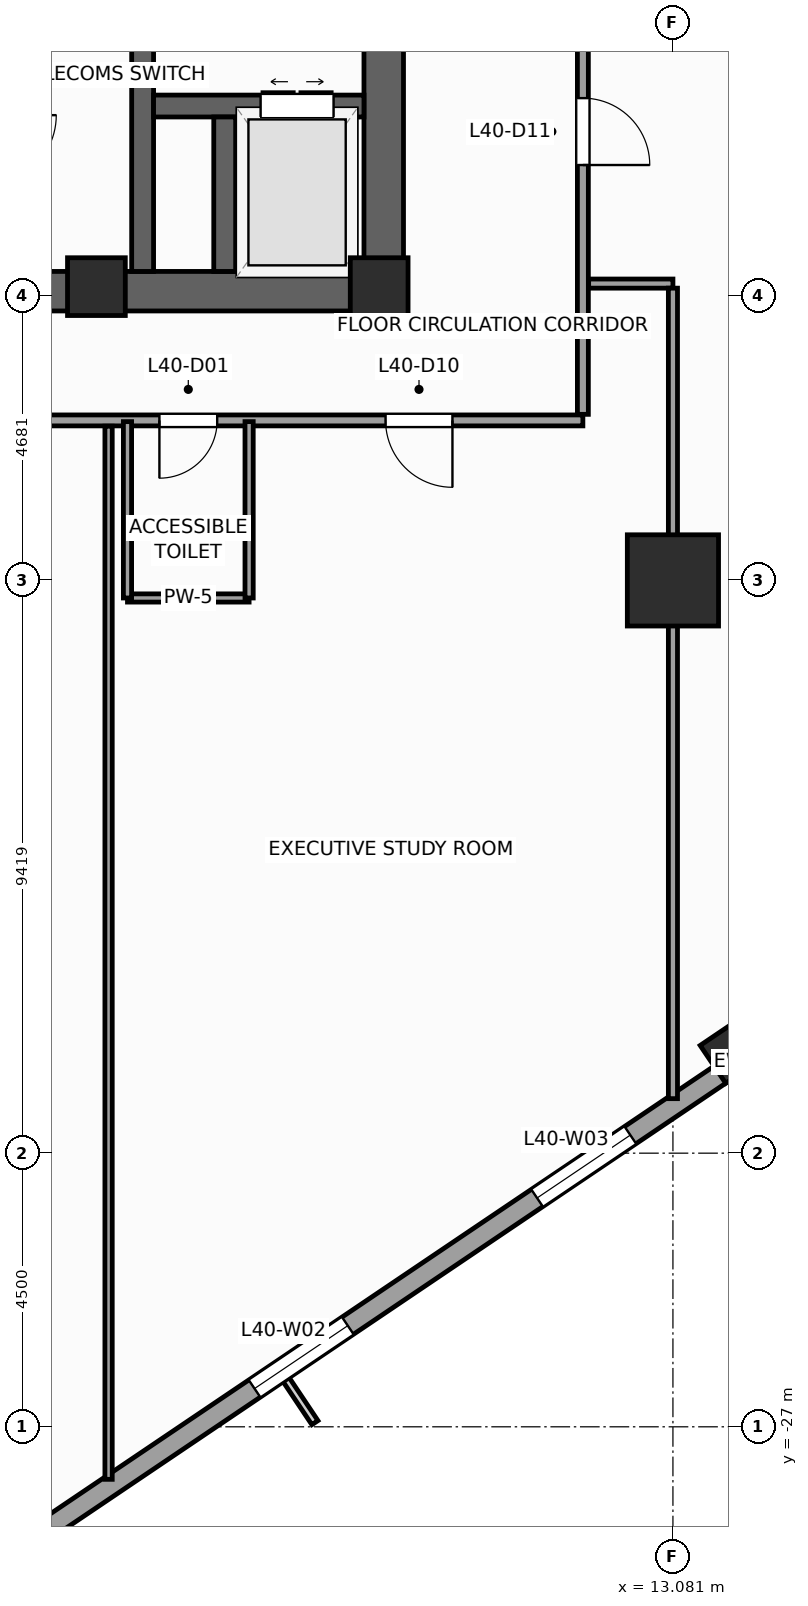
"""IFC4 building model, lengths in metres.
Left out: names, types, materials, properties, quantities, classifications, styles, units other than length and angle.
Written with IfcOpenShell. Run it as: python <this file> out.ifc"""

import sys

from ifc_helpers import new_model, si_unit, direction, frame, frame_2d, origin, origin_2d, place, context, subcontext, project, spatial, rectangle, extrude, source, transform, mapped, element, fill, save


model = new_model("IFC4")
c1 = context("Model", 3, precision=1e-05, world=origin(), true_north=direction((0.0, 1.0)))
c2 = subcontext(c1, "Body", "Model", "MODEL_VIEW")
j1 = project(units=[si_unit("LENGTHUNIT", "METRE"), si_unit("PLANEANGLEUNIT", "RADIAN")], contexts=[c1])
p1 = place(None, origin())
s1 = spatial("IfcSite", under=j1, at=p1, CompositionType="ELEMENT")
p2 = place(p1, origin())
s2 = spatial("IfcBuilding", under=s1, at=p2, CompositionType="ELEMENT")
p3 = place(p2, frame((0.0, 0.0, 168.4)))
s3 = spatial("IfcBuildingStorey", under=s2, at=p3, CompositionType="ELEMENT", Elevation=168.4)
p4 = place(p3, frame((-8.65, -8.325, 0.0), z_axis=(0.0, 0.0, 1.0), x_axis=(1.0, 0.0, 0.0)))
e1 = element("IfcWall", 1, at=p4, inside=s3, PredefinedType="SHEAR", context=c2, shape_type="SweptSolid", body=[
    extrude(rectangle(XDim=17.3, YDim=0.65, at=frame_2d((8.65, 0.0))), origin(), (0.0, 0.0, 1.0), 4.0),
])
p5 = place(p4, frame((8.0, 0.0, 0.0)))
e2 = element("IfcOpeningElement", 2, at=p5, cuts=e1, PredefinedType="OPENING", context=c2, shape_type="SweptSolid", body=[
    extrude(rectangle(XDim=1.3, YDim=2.2, at=frame_2d((0.65, 1.1))), frame((0.0, 0.335, 0.0), z_axis=(0.0, -1.0, 0.0), x_axis=(1.0, 0.0, 0.0)), (0.0, 0.0, 1.0), 0.67),
])
p6 = place(p3, frame((8.325, -8.0, 0.0), z_axis=(0.0, 0.0, 1.0), x_axis=(0.0, 1.0, 0.0)))
e3 = element("IfcWall", 3, at=p6, inside=s3, PredefinedType="SHEAR", context=c2, shape_type="SweptSolid", body=[
    extrude(rectangle(XDim=16.0, YDim=0.65, at=frame_2d((8.0, 0.0))), origin(), (0.0, 0.0, 1.0), 4.0),
])
p7 = place(p6, frame((4.69, 0.0, 0.0)))
e4 = element("IfcOpeningElement", 4, at=p7, cuts=e3, PredefinedType="OPENING", context=c2, shape_type="SweptSolid", body=[
    extrude(rectangle(XDim=1.3, YDim=2.2, at=frame_2d((0.65, 1.1))), frame((0.0, 0.335, 0.0), z_axis=(0.0, -1.0, 0.0), x_axis=(1.0, 0.0, 0.0)), (0.0, 0.0, 1.0), 0.67),
])
p8 = place(p3, frame((4.36, -8.0, 0.0), z_axis=(0.0, 0.0, 1.0), x_axis=(0.0, 1.0, 0.0)))
e5 = element("IfcWall", 5, at=p8, inside=s3, PredefinedType="SHEAR", context=c2, shape_type="SweptSolid", body=[
    extrude(rectangle(XDim=16.0, YDim=0.36, at=frame_2d((8.0, 0.0))), origin(), (0.0, 0.0, 1.0), 4.0),
])
p9 = place(p3, frame((4.54, -5.28, 0.0), z_axis=(0.0, 0.0, 1.0), x_axis=(1.0, 0.0, 0.0)))
e6 = element("IfcWall", 6, at=p9, inside=s3, PredefinedType="SHEAR", context=c2, shape_type="SweptSolid", body=[
    extrude(rectangle(XDim=3.46, YDim=0.36, at=frame_2d((1.73, 0.0))), origin(), (0.0, 0.0, 1.0), 4.0),
])
p10 = place(p9, frame((1.76, 0.0, 0.0)))
e7 = element("IfcOpeningElement", 7, at=p10, cuts=e6, PredefinedType="OPENING", context=c2, shape_type="SweptSolid", body=[
    extrude(rectangle(XDim=1.2, YDim=2.25, at=frame_2d((0.6, 1.125))), frame((0.0, 0.19, 0.0), z_axis=(0.0, -1.0, 0.0), x_axis=(1.0, 0.0, 0.0)), (0.0, 0.0, 1.0), 0.38),
])
p11 = place(p3, frame((5.71, -8.0, 0.0), z_axis=(0.0, 0.0, 1.0), x_axis=(0.0, 1.0, 0.0)))
e8 = element("IfcWall", 8, at=p11, inside=s3, PredefinedType="SHEAR", context=c2, shape_type="SweptSolid", body=[
    extrude(rectangle(XDim=2.54, YDim=0.36, at=frame_2d((1.27, 0.0))), origin(), (0.0, 0.0, 1.0), 4.0),
])
m1 = source(origin(), c2, "Body", "SweptSolid", [
    extrude(rectangle(XDim=0.95, YDim=0.95, at=origin_2d()), origin(), (0.0, 0.0, 1.0), 4.0),
])
for number, where, z_axis, x_axis in (
    (9, (8.25, -8.25, 0.0), (0.0, 0.0, 1.0), (1.0, 0.0, 0.0)),
    (10, (3.6, -8.25, 0.0), (0.0, 0.0, 1.0), (1.0, 0.0, 0.0)),
):
    element("IfcColumn", number, at=place(p3, frame(where, z_axis=z_axis, x_axis=x_axis)), inside=s3, PredefinedType="PILASTER", context=c2, shape_type="MappedRepresentation", body=[
        mapped(m1, transform((0.0, 0.0, 0.0), scale=1.0)),
    ])
m2 = source(origin(), c2, "Body", "SweptSolid", [
    extrude(rectangle(XDim=1.5, YDim=1.5, at=origin_2d()), origin(), (0.0, 0.0, 1.0), 4.0),
])
p12 = place(p3, frame((13.081, -13.081, 0.0), z_axis=(0.0, 0.0, 1.0), x_axis=(1.0, 0.0, 0.0)))
e11 = element("IfcColumn", 11, at=p12, inside=s3, PredefinedType="COLUMN", context=c2, shape_type="MappedRepresentation", body=[
    mapped(m2, transform((0.0, 0.0, 0.0), scale=1.0)),
])
m3 = source(origin(), c2, "Body", "SweptSolid", [
    extrude(rectangle(XDim=0.75, YDim=0.75, at=origin_2d()), origin(), (0.0, 0.0, 1.0), 4.0),
])
p13 = place(p3, frame((14.05, -20.83, 0.0), z_axis=(0.0, 0.0, 1.0), x_axis=(0.829037572555, 0.559192903471, 0.0)))
e12 = element("IfcColumn", 12, at=p13, inside=s3, PredefinedType="COLUMN", context=c2, shape_type="MappedRepresentation", body=[
    mapped(m3, transform((0.0, 0.0, 0.0), scale=1.0)),
])
p14 = place(p3, frame((-2.972, -32.558, 0.0), z_axis=(0.0, 0.0, 1.0), x_axis=(0.829036218961, 0.559194910251, 0.0)))
e13 = element("IfcWall", 13, at=p14, inside=s3, PredefinedType="STANDARD", context=c2, shape_type="SweptSolid", body=[
    extrude(rectangle(XDim=41.34, YDim=0.34, at=frame_2d((20.67, 0.0))), origin(), (0.0, 0.0, 1.0), 3.04),
])
p15 = place(p14, frame((4.261, 0.0, 0.56)))
e14 = element("IfcOpeningElement", 14, at=p15, cuts=e13, PredefinedType="OPENING", context=c2, shape_type="SweptSolid", body=[
    extrude(rectangle(XDim=1.4, YDim=2.4, at=frame_2d((0.7, 1.2))), frame((0.0, 0.18, 0.0), z_axis=(0.0, -1.0, 0.0), x_axis=(1.0, 0.0, 0.0)), (0.0, 0.0, 1.0), 0.36),
])
p16 = place(p14, frame((11.064, 0.0, 0.61)))
e15 = element("IfcOpeningElement", 15, at=p16, cuts=e13, PredefinedType="OPENING", context=c2, shape_type="SweptSolid", body=[
    extrude(rectangle(XDim=1.85, YDim=2.35, at=frame_2d((0.925, 1.175))), frame((0.0, 0.18, 0.0), z_axis=(0.0, -1.0, 0.0), x_axis=(1.0, 0.0, 0.0)), (0.0, 0.0, 1.0), 0.36),
])
p17 = place(p14, frame((16.668, 0.0, 0.61)))
e16 = element("IfcOpeningElement", 16, at=p17, cuts=e13, PredefinedType="OPENING", context=c2, shape_type="SweptSolid", body=[
    extrude(rectangle(XDim=1.85, YDim=2.35, at=frame_2d((0.925, 1.175))), frame((0.0, 0.18, 0.0), z_axis=(0.0, -1.0, 0.0), x_axis=(1.0, 0.0, 0.0)), (0.0, 0.0, 1.0), 0.36),
])
p18 = place(p14, frame((27.186, 0.0, 0.61)))
e17 = element("IfcOpeningElement", 17, at=p18, cuts=e13, PredefinedType="OPENING", context=c2, shape_type="SweptSolid", body=[
    extrude(rectangle(XDim=1.85, YDim=2.35, at=frame_2d((0.925, 1.175))), frame((0.0, 0.18, 0.0), z_axis=(0.0, -1.0, 0.0), x_axis=(1.0, 0.0, 0.0)), (0.0, 0.0, 1.0), 0.36),
])
p19 = place(p14, frame((34.852, 0.0, 0.56)))
e18 = element("IfcOpeningElement", 18, at=p19, cuts=e13, PredefinedType="OPENING", context=c2, shape_type="SweptSolid", body=[
    extrude(rectangle(XDim=1.4, YDim=2.4, at=frame_2d((0.7, 1.2))), frame((0.0, 0.18, 0.0), z_axis=(0.0, -1.0, 0.0), x_axis=(1.0, 0.0, 0.0)), (0.0, 0.0, 1.0), 0.36),
])
p20 = place(p3, frame((-10.45, -10.45, 0.0), z_axis=(0.0, 0.0, 1.0), x_axis=(1.0, 0.0, 0.0)))
e19 = element("IfcWall", 19, at=p20, inside=s3, PredefinedType="PARTITIONING", context=c2, shape_type="SweptSolid", body=[
    extrude(rectangle(XDim=22.05, YDim=0.18, at=frame_2d((11.025, 0.0))), origin(), (0.0, 0.0, 1.0), 3.74),
])
p21 = place(p20, frame((15.086, 0.0, 0.0)))
e20 = element("IfcOpeningElement", 20, at=p21, cuts=e19, PredefinedType="OPENING", context=c2, shape_type="SweptSolid", body=[
    extrude(rectangle(XDim=0.95, YDim=2.1, at=frame_2d((0.475, 1.05))), frame((0.0, 0.1, 0.0), z_axis=(0.0, -1.0, 0.0), x_axis=(1.0, 0.0, 0.0)), (0.0, 0.0, 1.0), 0.2),
])
p22 = place(p20, frame((7.611, 0.0, 0.0)))
e21 = element("IfcOpeningElement", 21, at=p22, cuts=e19, PredefinedType="OPENING", context=c2, shape_type="SweptSolid", body=[
    extrude(rectangle(XDim=0.95, YDim=2.1, at=frame_2d((0.475, 1.05))), frame((0.0, 0.1, 0.0), z_axis=(0.0, -1.0, 0.0), x_axis=(1.0, 0.0, 0.0)), (0.0, 0.0, 1.0), 0.2),
])
p23 = place(p20, frame((2.939, 0.0, 0.0)))
e22 = element("IfcOpeningElement", 22, at=p23, cuts=e19, PredefinedType="OPENING", context=c2, shape_type="SweptSolid", body=[
    extrude(rectangle(XDim=1.1, YDim=2.2, at=frame_2d((0.55, 1.1))), frame((0.0, 0.1, 0.0), z_axis=(0.0, -1.0, 0.0), x_axis=(1.0, 0.0, 0.0)), (0.0, 0.0, 1.0), 0.2),
])
p24 = place(p20, frame((11.175, 0.0, 0.0)))
e23 = element("IfcOpeningElement", 23, at=p24, cuts=e19, PredefinedType="OPENING", context=c2, shape_type="SweptSolid", body=[
    extrude(rectangle(XDim=1.1, YDim=2.2, at=frame_2d((0.55, 1.1))), frame((0.0, 0.1, 0.0), z_axis=(0.0, -1.0, 0.0), x_axis=(1.0, 0.0, 0.0)), (0.0, 0.0, 1.0), 0.2),
])
p25 = place(p20, frame((18.805, 0.0, 0.0)))
e24 = element("IfcOpeningElement", 24, at=p25, cuts=e19, PredefinedType="OPENING", context=c2, shape_type="SweptSolid", body=[
    extrude(rectangle(XDim=1.1, YDim=2.2, at=frame_2d((0.55, 1.1))), frame((0.0, 0.1, 0.0), z_axis=(0.0, -1.0, 0.0), x_axis=(1.0, 0.0, 0.0)), (0.0, 0.0, 1.0), 0.2),
])
p26 = place(p3, frame((11.6, -10.35, 0.0), z_axis=(0.0, 0.0, 1.0), x_axis=(0.0, 1.0, 0.0)))
e25 = element("IfcWall", 25, at=p26, inside=s3, PredefinedType="PARTITIONING", context=c2, shape_type="SweptSolid", body=[
    extrude(rectangle(XDim=11.95, YDim=0.18, at=frame_2d((5.975, 0.0))), origin(), (0.0, 0.0, 1.0), 3.74),
])
p27 = place(p26, frame((9.911, 0.0, 0.0)))
e26 = element("IfcOpeningElement", 26, at=p27, cuts=e25, PredefinedType="OPENING", context=c2, shape_type="SweptSolid", body=[
    extrude(rectangle(XDim=1.1, YDim=2.2, at=frame_2d((0.55, 1.1))), frame((0.0, 0.1, 0.0), z_axis=(0.0, -1.0, 0.0), x_axis=(1.0, 0.0, 0.0)), (0.0, 0.0, 1.0), 0.2),
])
p28 = place(p26, frame((4.1, 0.0, 0.0)))
e27 = element("IfcOpeningElement", 27, at=p28, cuts=e25, PredefinedType="OPENING", context=c2, shape_type="SweptSolid", body=[
    extrude(rectangle(XDim=1.1, YDim=2.2, at=frame_2d((0.55, 1.1))), frame((0.0, 0.1, 0.0), z_axis=(0.0, -1.0, 0.0), x_axis=(1.0, 0.0, 0.0)), (0.0, 0.0, 1.0), 0.2),
])
p29 = place(p26, frame((7.675, 0.0, 0.0)))
e28 = element("IfcOpeningElement", 28, at=p29, cuts=e25, PredefinedType="OPENING", context=c2, shape_type="SweptSolid", body=[
    extrude(rectangle(XDim=1.1, YDim=2.2, at=frame_2d((0.55, 1.1))), frame((0.0, 0.1, 0.0), z_axis=(0.0, -1.0, 0.0), x_axis=(1.0, 0.0, 0.0)), (0.0, 0.0, 1.0), 0.2),
])
p30 = place(p3, frame((3.8, -27.864, 0.0), z_axis=(0.0, 0.0, 1.0), x_axis=(0.0, 1.0, 0.0)))
e29 = element("IfcWall", 29, at=p30, inside=s3, PredefinedType="PARTITIONING", context=c2, shape_type="SweptSolid", body=[
    extrude(rectangle(XDim=17.319, YDim=0.12, at=frame_2d((8.659, 0.0))), origin(), (0.0, 0.0, 1.0), 3.74),
])
p31 = place(p3, frame((11.695, -8.2, 0.0), z_axis=(0.0, 0.0, 1.0), x_axis=(1.0, 0.0, 0.0)))
e30 = element("IfcWall", 30, at=p31, inside=s3, PredefinedType="PARTITIONING", context=c2, shape_type="SweptSolid", body=[
    extrude(rectangle(XDim=1.386, YDim=0.15, at=frame_2d((0.693, 0.0))), origin(), (0.0, 0.0, 1.0), 3.74),
])
p32 = place(p3, frame((13.081, -8.275, 0.0), z_axis=(0.0, 0.0, 1.0), x_axis=(0.0, -1.0, 0.0)))
e31 = element("IfcWall", 31, at=p32, inside=s3, PredefinedType="PARTITIONING", context=c2, shape_type="SweptSolid", body=[
    extrude(rectangle(XDim=13.329, YDim=0.15, at=frame_2d((6.664, 0.0))), origin(), (0.0, 0.0, 1.0), 2.84),
])
p33 = place(p3, frame((4.111, -13.37, 0.0), z_axis=(0.0, 0.0, 1.0), x_axis=(1.0, 0.0, 0.0)))
e32 = element("IfcWall", 32, at=p33, inside=s3, PredefinedType="PARTITIONING", context=c2, shape_type="SweptSolid", body=[
    extrude(rectangle(XDim=2.0, YDim=0.135, at=frame_2d((1.0, 0.0))), origin(), (0.0, 0.0, 1.0), 2.84),
])
for number, where, z_axis, x_axis in (
    (33, (6.111, -13.37, 0.0), (0.0, 0.0, 1.0), (0.0, 1.0, 0.0)),
    (34, (4.111, -13.37, 0.0), (0.0, 0.0, 1.0), (0.0, 1.0, 0.0)),
):
    element("IfcWall", number, at=place(p3, frame(where, z_axis=z_axis, x_axis=x_axis)), inside=s3, PredefinedType="PARTITIONING", context=c2, shape_type="SweptSolid", body=[
        extrude(rectangle(XDim=2.9, YDim=0.135, at=frame_2d((1.45, 0.0))), origin(), (0.0, 0.0, 1.0), 3.74),
    ])
m4 = source(origin(), c2, "Body", "SweptSolid", [
    extrude(rectangle(XDim=1.85, YDim=2.35, at=frame_2d((0.925, 1.175))), frame((0.0, 0.03, 0.0), z_axis=(0.0, -1.0, 0.0), x_axis=(1.0, 0.0, 0.0)), (0.0, 0.0, 1.0), 0.06),
])
p34 = place(p16, origin())
e35 = element("IfcWindow", 35, at=p34, inside=s3, PartitioningType="SINGLE_PANEL", PredefinedType="WINDOW", context=c2, shape_type="MappedRepresentation", body=[
    mapped(m4, transform((0.0, 0.0, 0.0), scale=1.0)),
])
fill(e15, e35)
p35 = place(p17, origin())
e36 = element("IfcWindow", 36, at=p35, inside=s3, PartitioningType="SINGLE_PANEL", PredefinedType="WINDOW", context=c2, shape_type="MappedRepresentation", body=[
    mapped(m4, transform((0.0, 0.0, 0.0), scale=1.0)),
])
fill(e16, e36)
m5 = source(origin(), c2, "Body", "SweptSolid", [
    extrude(rectangle(XDim=1.2, YDim=2.25, at=frame_2d((0.6, 1.125))), frame((0.0, 0.025, 0.0), z_axis=(0.0, -1.0, 0.0), x_axis=(1.0, 0.0, 0.0)), (0.0, 0.0, 1.0), 0.05),
])
p36 = place(p10, origin())
e37 = element("IfcDoor", 37, at=p36, inside=s3, OperationType="DOUBLE_DOOR_SLIDING", PredefinedType="DOOR", context=c2, shape_type="MappedRepresentation", body=[
    mapped(m5, transform((0.0, 0.0, 0.0), scale=1.0)),
])
fill(e7, e37)
m6 = source(origin(), c2, "Body", "SweptSolid", [
    extrude(rectangle(XDim=0.95, YDim=2.1, at=frame_2d((0.475, 1.05))), frame((0.0, 0.025, 0.0), z_axis=(0.0, -1.0, 0.0), x_axis=(1.0, 0.0, 0.0)), (0.0, 0.0, 1.0), 0.05),
])
p37 = place(p21, frame((0.95, 0.0, 0.0), z_axis=(0.0, 0.0, 1.0), x_axis=(-1.0, 0.0, 0.0)))
e38 = element("IfcDoor", 38, at=p37, inside=s3, OperationType="SINGLE_SWING_LEFT", PredefinedType="DOOR", context=c2, shape_type="MappedRepresentation", body=[
    mapped(m6, transform((0.0, 0.0, 0.0), scale=1.0)),
])
fill(e20, e38)
m7 = source(origin(), c2, "Body", "SweptSolid", [
    extrude(rectangle(XDim=1.1, YDim=2.2, at=frame_2d((0.55, 1.1))), frame((0.0, 0.025, 0.0), z_axis=(0.0, -1.0, 0.0), x_axis=(1.0, 0.0, 0.0)), (0.0, 0.0, 1.0), 0.05),
])
p38 = place(p25, frame((1.1, 0.0, 0.0), z_axis=(0.0, 0.0, 1.0), x_axis=(-1.0, 0.0, 0.0)))
e39 = element("IfcDoor", 39, at=p38, inside=s3, OperationType="SINGLE_SWING_RIGHT", PredefinedType="DOOR", context=c2, shape_type="MappedRepresentation", body=[
    mapped(m7, transform((0.0, 0.0, 0.0), scale=1.0)),
])
fill(e24, e39)
p39 = place(p28, frame((1.1, 0.0, 0.0), z_axis=(0.0, 0.0, 1.0), x_axis=(-1.0, 0.0, 0.0)))
e40 = element("IfcDoor", 40, at=p39, inside=s3, OperationType="SINGLE_SWING_LEFT", PredefinedType="DOOR", context=c2, shape_type="MappedRepresentation", body=[
    mapped(m7, transform((0.0, 0.0, 0.0), scale=1.0)),
])
fill(e27, e40)
save(model, sys.argv[1])
